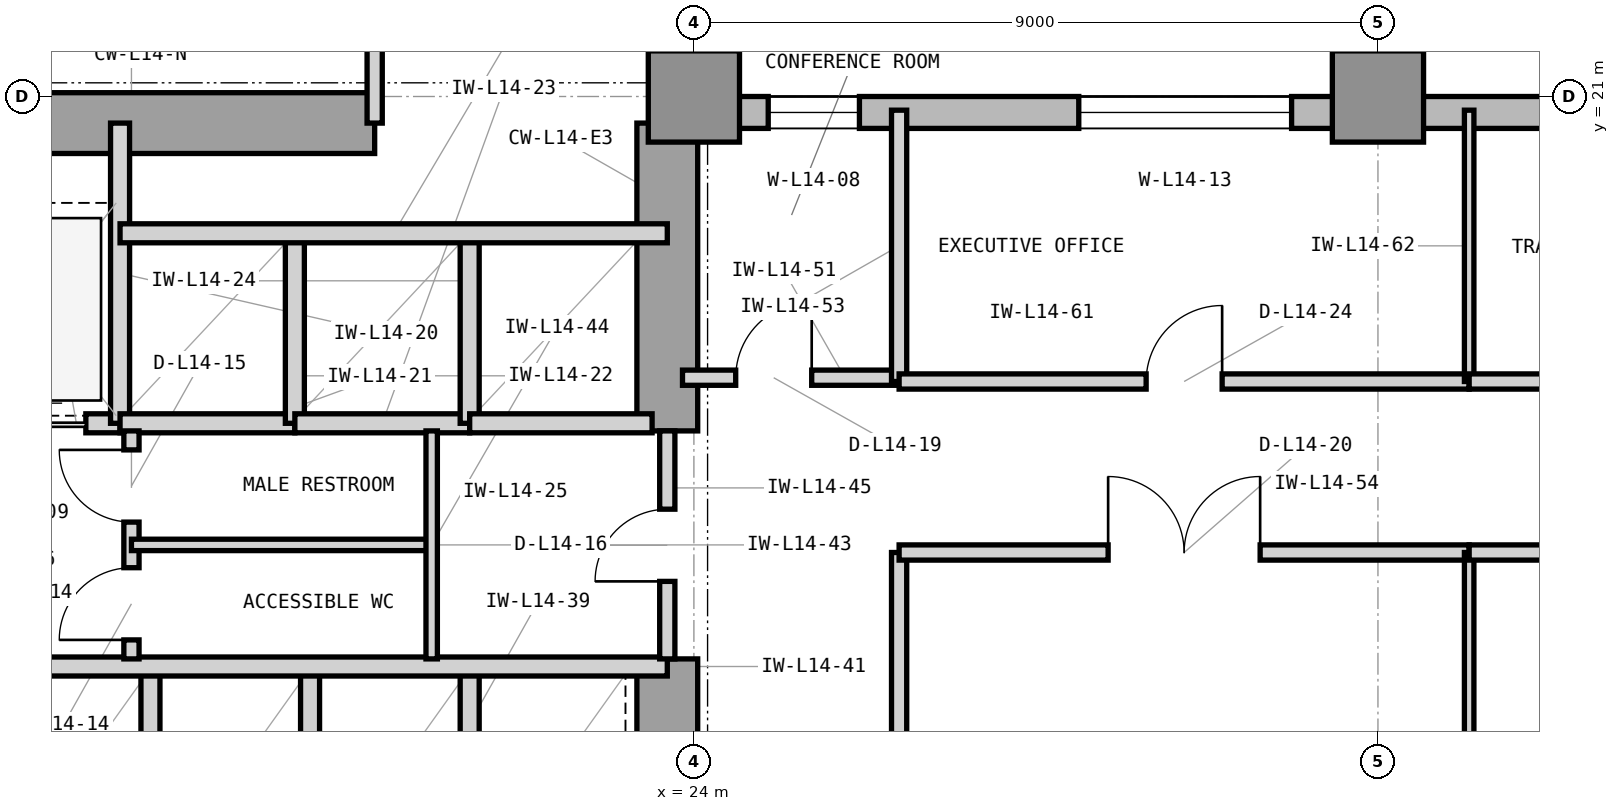
"""IFC4 building model, lengths in metres.
Left out: names, types, materials, properties, quantities, classifications, styles, units other than length and angle.
Written with IfcOpenShell. Run it as: python <this file> out.ifc"""

import sys

from ifc_helpers import new_model, si_unit, direction, frame, frame_2d, origin, origin_2d, place, context, subcontext, project, spatial, rectangle, extrude, element, fill, save


model = new_model("IFC4")
c1 = context("Model", 3, precision=1e-05, world=origin(), true_north=direction((0.0, 1.0)))
c2 = subcontext(c1, "Body", "Model", "MODEL_VIEW")
j1 = project(units=[si_unit("LENGTHUNIT", "METRE"), si_unit("PLANEANGLEUNIT", "RADIAN")], contexts=[c1])
p1 = place(None, origin())
s1 = spatial("IfcSite", under=j1, at=p1, CompositionType="ELEMENT")
p2 = place(p1, origin())
s2 = spatial("IfcBuilding", under=s1, at=p2, CompositionType="ELEMENT")
p3 = place(p2, frame((0.0, 0.0, 63.6)))
s3 = spatial("IfcBuildingStorey", under=s2, at=p3, CompositionType="ELEMENT", Elevation=63.6)
p4 = place(p3, frame((7.475, 20.65, 0.0), z_axis=(0.0, 0.0, 1.0), x_axis=(1.0, 0.0, 0.0)))
e1 = element("IfcWall", 1, at=p4, inside=s3, PredefinedType="SHEAR", context=c2, shape_type="SweptSolid", body=[
    extrude(rectangle(XDim=12.325, YDim=0.8, at=frame_2d((6.163, 0.0))), origin(), (0.0, 0.0, 1.0), 4.2),
])
p5 = place(p3, frame((23.65, 10.4, 0.0), z_axis=(0.0, 0.0, 1.0), x_axis=(0.0, 1.0, 0.0)))
e2 = element("IfcWall", 2, at=p5, inside=s3, PredefinedType="SHEAR", context=c2, shape_type="SweptSolid", body=[
    extrude(rectangle(XDim=3.2, YDim=0.8, at=frame_2d((1.6, 0.0))), origin(), (0.0, 0.0, 1.0), 4.2),
])
p6 = place(p3, frame((23.65, 16.6, 0.0), z_axis=(0.0, 0.0, 1.0), x_axis=(0.0, 1.0, 0.0)))
e3 = element("IfcWall", 3, at=p6, inside=s3, PredefinedType="SHEAR", context=c2, shape_type="SweptSolid", body=[
    extrude(rectangle(XDim=4.05, YDim=0.8, at=frame_2d((2.025, 0.0))), origin(), (0.0, 0.0, 1.0), 4.2),
])
for number, where, z_axis, x_axis in (
    (4, (24.0, 21.0, 0.0), (0.0, 0.0, 1.0), (1.0, 0.0, 0.0)),
    (5, (33.0, 21.0, 0.0), (0.0, 0.0, 1.0), (1.0, 0.0, 0.0)),
):
    element("IfcColumn", number, at=place(p3, frame(where, z_axis=z_axis, x_axis=x_axis)), inside=s3, PredefinedType="COLUMN", context=c2, shape_type="SweptSolid", body=[
        extrude(rectangle(XDim=1.2, YDim=1.2, at=origin_2d()), origin(), (0.0, 0.0, 1.0), 4.2),
    ])
p7 = place(p3, frame((64.4, 20.79, 0.0), z_axis=(0.0, 0.0, 1.0), x_axis=(-1.0, 0.0, 0.0)))
e6 = element("IfcWall", 6, at=p7, inside=s3, PredefinedType="STANDARD", context=c2, shape_type="SweptSolid", body=[
    extrude(rectangle(XDim=40.4, YDim=0.42, at=frame_2d((20.2, 0.0))), origin(), (0.0, 0.0, 1.0), 3.98),
])
p8 = place(p7, frame((26.375, 0.0, 0.85)))
e7 = element("IfcOpeningElement", 7, at=p8, cuts=e6, PredefinedType="OPENING", context=c2, shape_type="SweptSolid", body=[
    extrude(rectangle(XDim=2.8, YDim=2.45, at=frame_2d((1.4, 1.225))), frame((0.0, 0.22, 0.0), z_axis=(0.0, -1.0, 0.0), x_axis=(1.0, 0.0, 0.0)), (0.0, 0.0, 1.0), 0.44),
])
p9 = place(p7, frame((38.222, 0.0, 0.85)))
e8 = element("IfcOpeningElement", 8, at=p9, cuts=e6, PredefinedType="OPENING", context=c2, shape_type="SweptSolid", body=[
    extrude(rectangle(XDim=1.2, YDim=2.45, at=frame_2d((0.6, 1.225))), frame((0.0, 0.22, 0.0), z_axis=(0.0, -1.0, 0.0), x_axis=(1.0, 0.0, 0.0)), (0.0, 0.0, 1.0), 0.44),
])
p10 = place(p7, frame((32.536, 0.0, 0.85)))
e9 = element("IfcOpeningElement", 9, at=p10, cuts=e6, PredefinedType="OPENING", context=c2, shape_type="SweptSolid", body=[
    extrude(rectangle(XDim=2.8, YDim=2.45, at=frame_2d((1.4, 1.225))), frame((0.0, 0.22, 0.0), z_axis=(0.0, -1.0, 0.0), x_axis=(1.0, 0.0, 0.0)), (0.0, 0.0, 1.0), 0.44),
])
p11 = place(p7, frame((17.386, 0.0, 0.85)))
e10 = element("IfcOpeningElement", 10, at=p11, cuts=e6, PredefinedType="OPENING", context=c2, shape_type="SweptSolid", body=[
    extrude(rectangle(XDim=2.8, YDim=2.45, at=frame_2d((1.4, 1.225))), frame((0.0, 0.22, 0.0), z_axis=(0.0, -1.0, 0.0), x_axis=(1.0, 0.0, 0.0)), (0.0, 0.0, 1.0), 0.44),
])
p12 = place(p3, frame((23.79, 21.0, 0.0), z_axis=(0.0, 0.0, 1.0), x_axis=(0.0, 1.0, 0.0)))
e11 = element("IfcWall", 11, at=p12, inside=s3, PredefinedType="STANDARD", context=c2, shape_type="SweptSolid", body=[
    extrude(rectangle(XDim=28.4, YDim=0.42, at=frame_2d((14.2, 0.0))), origin(), (0.0, 0.0, 1.0), 3.98),
])
p13 = place(p12, frame((10.433, 0.0, 0.85)))
e12 = element("IfcOpeningElement", 12, at=p13, cuts=e11, PredefinedType="OPENING", context=c2, shape_type="SweptSolid", body=[
    extrude(rectangle(XDim=2.8, YDim=2.45, at=frame_2d((1.4, 1.225))), frame((0.0, 0.22, 0.0), z_axis=(0.0, -1.0, 0.0), x_axis=(1.0, 0.0, 0.0)), (0.0, 0.0, 1.0), 0.44),
])
p14 = place(p12, frame((16.016, 0.0, 0.85)))
e13 = element("IfcOpeningElement", 13, at=p14, cuts=e11, PredefinedType="OPENING", context=c2, shape_type="SweptSolid", body=[
    extrude(rectangle(XDim=1.2, YDim=2.45, at=frame_2d((0.6, 1.225))), frame((0.0, 0.22, 0.0), z_axis=(0.0, -1.0, 0.0), x_axis=(1.0, 0.0, 0.0)), (0.0, 0.0, 1.0), 0.44),
])
p15 = place(p3, frame((14.15, 16.7, 0.0), z_axis=(0.0, 0.0, 1.0), x_axis=(1.0, 0.0, 0.0)))
e14 = element("IfcWall", 14, at=p15, inside=s3, PredefinedType="PARTITIONING", context=c2, shape_type="SweptSolid", body=[
    extrude(rectangle(XDim=2.3, YDim=0.25, at=frame_2d((1.15, 0.0))), origin(), (0.0, 0.0, 1.0), 3.426),
])
p16 = place(p15, frame((0.45, 0.0, 0.0)))
e15 = element("IfcOpeningElement", 15, at=p16, cuts=e14, PredefinedType="OPENING", context=c2, shape_type="SweptSolid", body=[
    extrude(rectangle(XDim=1.4, YDim=2.35, at=frame_2d((0.7, 1.175))), frame((0.0, 0.135, 0.0), z_axis=(0.0, -1.0, 0.0), x_axis=(1.0, 0.0, 0.0)), (0.0, 0.0, 1.0), 0.27),
])
p17 = place(p3, frame((16.45, 16.7, 0.0), z_axis=(0.0, 0.0, 1.0), x_axis=(0.0, 1.0, 0.0)))
e16 = element("IfcWall", 16, at=p17, inside=s3, PredefinedType="PARTITIONING", context=c2, shape_type="SweptSolid", body=[
    extrude(rectangle(XDim=3.95, YDim=0.25, at=frame_2d((1.975, 0.0))), origin(), (0.0, 0.0, 1.0), 3.97),
])
p18 = place(p3, frame((16.45, 16.7, 0.0), z_axis=(0.0, 0.0, 1.0), x_axis=(1.0, 0.0, 0.0)))
e17 = element("IfcWall", 17, at=p18, inside=s3, PredefinedType="PARTITIONING", context=c2, shape_type="SweptSolid", body=[
    extrude(rectangle(XDim=2.3, YDim=0.25, at=frame_2d((1.15, 0.0))), origin(), (0.0, 0.0, 1.0), 3.426),
])
p19 = place(p3, frame((18.75, 16.7, 0.0), z_axis=(0.0, 0.0, 1.0), x_axis=(0.0, 1.0, 0.0)))
e18 = element("IfcWall", 18, at=p19, inside=s3, PredefinedType="PARTITIONING", context=c2, shape_type="SweptSolid", body=[
    extrude(rectangle(XDim=2.5, YDim=0.25, at=frame_2d((1.25, 0.0))), origin(), (0.0, 0.0, 1.0), 3.97),
])
p20 = place(p3, frame((18.75, 16.7, 0.0), z_axis=(0.0, 0.0, 1.0), x_axis=(1.0, 0.0, 0.0)))
e19 = element("IfcWall", 19, at=p20, inside=s3, PredefinedType="PARTITIONING", context=c2, shape_type="SweptSolid", body=[
    extrude(rectangle(XDim=2.3, YDim=0.25, at=frame_2d((1.15, 0.0))), origin(), (0.0, 0.0, 1.0), 3.426),
])
p21 = place(p3, frame((21.05, 16.7, 0.0), z_axis=(0.0, 0.0, 1.0), x_axis=(0.0, 1.0, 0.0)))
e20 = element("IfcWall", 20, at=p21, inside=s3, PredefinedType="PARTITIONING", context=c2, shape_type="SweptSolid", body=[
    extrude(rectangle(XDim=2.5, YDim=0.25, at=frame_2d((1.25, 0.0))), origin(), (0.0, 0.0, 1.0), 3.97),
])
p22 = place(p3, frame((21.05, 16.7, 0.0), z_axis=(0.0, 0.0, 1.0), x_axis=(1.0, 0.0, 0.0)))
e21 = element("IfcWall", 21, at=p22, inside=s3, PredefinedType="PARTITIONING", context=c2, shape_type="SweptSolid", body=[
    extrude(rectangle(XDim=2.4, YDim=0.25, at=frame_2d((1.2, 0.0))), origin(), (0.0, 0.0, 1.0), 3.426),
])
p23 = place(p3, frame((16.45, 19.2, 0.0), z_axis=(0.0, 0.0, 1.0), x_axis=(1.0, 0.0, 0.0)))
e22 = element("IfcWall", 22, at=p23, inside=s3, PredefinedType="PARTITIONING", context=c2, shape_type="SweptSolid", body=[
    extrude(rectangle(XDim=7.2, YDim=0.25, at=frame_2d((3.6, 0.0))), origin(), (0.0, 0.0, 1.0), 3.97),
])
for number, where, z_axis, x_axis in (
    (23, (16.85, 10.5, 0.0), (0.0, 0.0, 1.0), (0.0, 1.0, 0.0)),
    (24, (18.95, 10.5, 0.0), (0.0, 0.0, 1.0), (0.0, 1.0, 0.0)),
    (25, (21.05, 10.5, 0.0), (0.0, 0.0, 1.0), (0.0, 1.0, 0.0)),
):
    element("IfcWall", number, at=place(p3, frame(where, z_axis=z_axis, x_axis=x_axis)), inside=s3, PredefinedType="PARTITIONING", context=c2, shape_type="SweptSolid", body=[
        extrude(rectangle(XDim=3.0, YDim=0.25, at=frame_2d((1.5, 0.0))), origin(), (0.0, 0.0, 1.0), 3.97),
    ])
p24 = place(p3, frame((14.7, 13.5, 0.0), z_axis=(0.0, 0.0, 1.0), x_axis=(1.0, 0.0, 0.0)))
e26 = element("IfcWall", 26, at=p24, inside=s3, PredefinedType="PARTITIONING", context=c2, shape_type="SweptSolid", body=[
    extrude(rectangle(XDim=8.95, YDim=0.25, at=frame_2d((4.475, 0.0))), origin(), (0.0, 0.0, 1.0), 3.426),
])
p25 = place(p3, frame((16.6, 13.6, 0.0), z_axis=(0.0, 0.0, 1.0), x_axis=(0.0, 1.0, 0.0)))
e27 = element("IfcWall", 27, at=p25, inside=s3, PredefinedType="PARTITIONING", context=c2, shape_type="SweptSolid", body=[
    extrude(rectangle(XDim=3.0, YDim=0.2, at=frame_2d((1.5, 0.0))), origin(), (0.0, 0.0, 1.0), 3.97),
])
p26 = place(p25, frame((0.25, 0.0, 0.0)))
e28 = element("IfcOpeningElement", 28, at=p26, cuts=e27, PredefinedType="OPENING", context=c2, shape_type="SweptSolid", body=[
    extrude(rectangle(XDim=0.95, YDim=2.1, at=frame_2d((0.475, 1.05))), frame((0.0, 0.11, 0.0), z_axis=(0.0, -1.0, 0.0), x_axis=(1.0, 0.0, 0.0)), (0.0, 0.0, 1.0), 0.22),
])
p27 = place(p25, frame((1.8, 0.0, 0.0)))
e29 = element("IfcOpeningElement", 29, at=p27, cuts=e27, PredefinedType="OPENING", context=c2, shape_type="SweptSolid", body=[
    extrude(rectangle(XDim=0.95, YDim=2.1, at=frame_2d((0.475, 1.05))), frame((0.0, 0.11, 0.0), z_axis=(0.0, -1.0, 0.0), x_axis=(1.0, 0.0, 0.0)), (0.0, 0.0, 1.0), 0.22),
])
p28 = place(p3, frame((16.6, 15.1, 0.0), z_axis=(0.0, 0.0, 1.0), x_axis=(1.0, 0.0, 0.0)))
e30 = element("IfcWall", 30, at=p28, inside=s3, PredefinedType="PARTITIONING", context=c2, shape_type="SweptSolid", body=[
    extrude(rectangle(XDim=3.95, YDim=0.15, at=frame_2d((1.975, 0.0))), origin(), (0.0, 0.0, 1.0), 3.97),
])
p29 = place(p3, frame((20.55, 13.6, 0.0), z_axis=(0.0, 0.0, 1.0), x_axis=(0.0, 1.0, 0.0)))
e31 = element("IfcWall", 31, at=p29, inside=s3, PredefinedType="PARTITIONING", context=c2, shape_type="SweptSolid", body=[
    extrude(rectangle(XDim=3.0, YDim=0.15, at=frame_2d((1.5, 0.0))), origin(), (0.0, 0.0, 1.0), 3.97),
])
p30 = place(p3, frame((23.65, 13.6, 0.0), z_axis=(0.0, 0.0, 1.0), x_axis=(0.0, 1.0, 0.0)))
e32 = element("IfcWall", 32, at=p30, inside=s3, PredefinedType="PARTITIONING", context=c2, shape_type="SweptSolid", body=[
    extrude(rectangle(XDim=3.0, YDim=0.2, at=frame_2d((1.5, 0.0))), origin(), (0.0, 0.0, 1.0), 3.97),
])
p31 = place(p30, frame((1.02, 0.0, 0.0)))
e33 = element("IfcOpeningElement", 33, at=p31, cuts=e32, PredefinedType="OPENING", context=c2, shape_type="SweptSolid", body=[
    extrude(rectangle(XDim=0.95, YDim=2.1, at=frame_2d((0.475, 1.05))), frame((0.0, 0.11, 0.0), z_axis=(0.0, -1.0, 0.0), x_axis=(1.0, 0.0, 0.0)), (0.0, 0.0, 1.0), 0.22),
])
p32 = place(p3, frame((23.85, 17.3, 0.0), z_axis=(0.0, 0.0, 1.0), x_axis=(1.0, 0.0, 0.0)))
e34 = element("IfcWall", 34, at=p32, inside=s3, PredefinedType="PARTITIONING", context=c2, shape_type="SweptSolid", body=[
    extrude(rectangle(XDim=2.85, YDim=0.2, at=frame_2d((1.425, 0.0))), origin(), (0.0, 0.0, 1.0), 3.97),
])
p33 = place(p32, frame((0.7, 0.0, 0.0)))
e35 = element("IfcOpeningElement", 35, at=p33, cuts=e34, PredefinedType="OPENING", context=c2, shape_type="SweptSolid", body=[
    extrude(rectangle(XDim=1.0, YDim=2.15, at=frame_2d((0.5, 1.075))), frame((0.0, 0.11, 0.0), z_axis=(0.0, -1.0, 0.0), x_axis=(1.0, 0.0, 0.0)), (0.0, 0.0, 1.0), 0.22),
])
p34 = place(p3, frame((26.7, 3.18, 0.0), z_axis=(0.0, 0.0, 1.0), x_axis=(0.0, 1.0, 0.0)))
e36 = element("IfcWall", 36, at=p34, inside=s3, PredefinedType="PARTITIONING", context=c2, shape_type="SweptSolid", body=[
    extrude(rectangle(XDim=11.82, YDim=0.2, at=frame_2d((5.91, 0.0))), origin(), (0.0, 0.0, 1.0), 3.97),
])
p35 = place(p3, frame((26.7, 17.25, 0.0), z_axis=(0.0, 0.0, 1.0), x_axis=(0.0, 1.0, 0.0)))
e37 = element("IfcWall", 37, at=p35, inside=s3, PredefinedType="PARTITIONING", context=c2, shape_type="SweptSolid", body=[
    extrude(rectangle(XDim=3.57, YDim=0.2, at=frame_2d((1.785, 0.0))), origin(), (0.0, 0.0, 1.0), 3.97),
])
p36 = place(p3, frame((26.7, 15.0, 0.0), z_axis=(0.0, 0.0, 1.0), x_axis=(1.0, 0.0, 0.0)))
e38 = element("IfcWall", 38, at=p36, inside=s3, PredefinedType="PARTITIONING", context=c2, shape_type="SweptSolid", body=[
    extrude(rectangle(XDim=7.5, YDim=0.2, at=frame_2d((3.75, 0.0))), origin(), (0.0, 0.0, 1.0), 3.426),
])
p37 = place(p36, frame((2.75, 0.0, 0.0)))
e39 = element("IfcOpeningElement", 39, at=p37, cuts=e38, PredefinedType="OPENING", context=c2, shape_type="SweptSolid", body=[
    extrude(rectangle(XDim=2.0, YDim=2.5, at=frame_2d((1.0, 1.25))), frame((0.0, 0.11, 0.0), z_axis=(0.0, -1.0, 0.0), x_axis=(1.0, 0.0, 0.0)), (0.0, 0.0, 1.0), 0.22),
])
p38 = place(p3, frame((34.2, 3.18, 0.0), z_axis=(0.0, 0.0, 1.0), x_axis=(0.0, 1.0, 0.0)))
e40 = element("IfcWall", 40, at=p38, inside=s3, PredefinedType="PARTITIONING", context=c2, shape_type="SweptSolid", body=[
    extrude(rectangle(XDim=11.82, YDim=0.125, at=frame_2d((5.91, 0.0))), origin(), (0.0, 0.0, 1.0), 3.97),
])
p39 = place(p3, frame((34.2, 15.0, 0.0), z_axis=(0.0, 0.0, 1.0), x_axis=(1.0, 0.0, 0.0)))
e41 = element("IfcWall", 41, at=p39, inside=s3, PredefinedType="PARTITIONING", context=c2, shape_type="SweptSolid", body=[
    extrude(rectangle(XDim=7.5, YDim=0.2, at=frame_2d((3.75, 0.0))), origin(), (0.0, 0.0, 1.0), 3.426),
])
p40 = place(p39, frame((3.25, 0.0, 0.0)))
e42 = element("IfcOpeningElement", 42, at=p40, cuts=e41, PredefinedType="OPENING", context=c2, shape_type="SweptSolid", body=[
    extrude(rectangle(XDim=1.0, YDim=2.15, at=frame_2d((0.5, 1.075))), frame((0.0, 0.11, 0.0), z_axis=(0.0, -1.0, 0.0), x_axis=(1.0, 0.0, 0.0)), (0.0, 0.0, 1.0), 0.22),
])
p41 = place(p3, frame((26.7, 17.25, 0.0), z_axis=(0.0, 0.0, 1.0), x_axis=(1.0, 0.0, 0.0)))
e43 = element("IfcWall", 43, at=p41, inside=s3, PredefinedType="PARTITIONING", context=c2, shape_type="SweptSolid", body=[
    extrude(rectangle(XDim=7.5, YDim=0.2, at=frame_2d((3.75, 0.0))), origin(), (0.0, 0.0, 1.0), 3.97),
])
p42 = place(p41, frame((3.25, 0.0, 0.0)))
e44 = element("IfcOpeningElement", 44, at=p42, cuts=e43, PredefinedType="OPENING", context=c2, shape_type="SweptSolid", body=[
    extrude(rectangle(XDim=1.0, YDim=2.15, at=frame_2d((0.5, 1.075))), frame((0.0, 0.11, 0.0), z_axis=(0.0, -1.0, 0.0), x_axis=(1.0, 0.0, 0.0)), (0.0, 0.0, 1.0), 0.22),
])
p43 = place(p3, frame((34.2, 17.25, 0.0), z_axis=(0.0, 0.0, 1.0), x_axis=(0.0, 1.0, 0.0)))
e45 = element("IfcWall", 45, at=p43, inside=s3, PredefinedType="PARTITIONING", context=c2, shape_type="SweptSolid", body=[
    extrude(rectangle(XDim=3.57, YDim=0.125, at=frame_2d((1.785, 0.0))), origin(), (0.0, 0.0, 1.0), 3.97),
])
p44 = place(p3, frame((34.2, 17.25, 0.0), z_axis=(0.0, 0.0, 1.0), x_axis=(1.0, 0.0, 0.0)))
e46 = element("IfcWall", 46, at=p44, inside=s3, PredefinedType="PARTITIONING", context=c2, shape_type="SweptSolid", body=[
    extrude(rectangle(XDim=9.0, YDim=0.2, at=frame_2d((4.5, 0.0))), origin(), (0.0, 0.0, 1.0), 3.97),
])
p45 = place(p44, frame((4.0, 0.0, 0.0)))
e47 = element("IfcOpeningElement", 47, at=p45, cuts=e46, PredefinedType="OPENING", context=c2, shape_type="SweptSolid", body=[
    extrude(rectangle(XDim=1.0, YDim=2.15, at=frame_2d((0.5, 1.075))), frame((0.0, 0.11, 0.0), z_axis=(0.0, -1.0, 0.0), x_axis=(1.0, 0.0, 0.0)), (0.0, 0.0, 1.0), 0.22),
])
p46 = place(p3, frame((19.8, 20.65, 0.0), z_axis=(0.0, 0.0, 1.0), x_axis=(0.0, 1.0, 0.0)))
e48 = element("IfcWall", 48, at=p46, inside=s3, PredefinedType="PARTITIONING", context=c2, shape_type="SweptSolid", body=[
    extrude(rectangle(XDim=6.15, YDim=0.2, at=frame_2d((3.075, 0.0))), origin(), (0.0, 0.0, 1.0), 3.97),
])
p47 = place(p16, origin())
e49 = element("IfcDoor", 49, at=p47, inside=s3, OperationType="DOUBLE_DOOR_SLIDING", PredefinedType="DOOR", context=c2, shape_type="SweptSolid", body=[
    extrude(rectangle(XDim=1.4, YDim=2.35, at=frame_2d((0.7, 1.175))), frame((0.0, 0.025, 0.0), z_axis=(0.0, -1.0, 0.0), x_axis=(1.0, 0.0, 0.0)), (0.0, 0.0, 1.0), 0.05),
])
fill(e15, e49)
p48 = place(p26, origin())
e50 = element("IfcDoor", 50, at=p48, inside=s3, OperationType="SINGLE_SWING_LEFT", PredefinedType="DOOR", context=c2, shape_type="SweptSolid", body=[
    extrude(rectangle(XDim=0.95, YDim=2.1, at=frame_2d((0.475, 1.05))), frame((0.0, 0.025, 0.0), z_axis=(0.0, -1.0, 0.0), x_axis=(1.0, 0.0, 0.0)), (0.0, 0.0, 1.0), 0.05),
])
fill(e28, e50)
p49 = place(p27, origin())
e51 = element("IfcDoor", 51, at=p49, inside=s3, OperationType="SINGLE_SWING_RIGHT", PredefinedType="DOOR", context=c2, shape_type="SweptSolid", body=[
    extrude(rectangle(XDim=0.95, YDim=2.1, at=frame_2d((0.475, 1.05))), frame((0.0, 0.025, 0.0), z_axis=(0.0, -1.0, 0.0), x_axis=(1.0, 0.0, 0.0)), (0.0, 0.0, 1.0), 0.05),
])
fill(e29, e51)
p50 = place(p31, origin())
e52 = element("IfcDoor", 52, at=p50, inside=s3, OperationType="SINGLE_SWING_LEFT", PredefinedType="DOOR", context=c2, shape_type="SweptSolid", body=[
    extrude(rectangle(XDim=0.95, YDim=2.1, at=frame_2d((0.475, 1.05))), frame((0.0, 0.025, 0.0), z_axis=(0.0, -1.0, 0.0), x_axis=(1.0, 0.0, 0.0)), (0.0, 0.0, 1.0), 0.05),
])
fill(e33, e52)
p51 = place(p33, origin())
e53 = element("IfcDoor", 53, at=p51, inside=s3, OperationType="SINGLE_SWING_RIGHT", PredefinedType="DOOR", context=c2, shape_type="SweptSolid", body=[
    extrude(rectangle(XDim=1.0, YDim=2.15, at=frame_2d((0.5, 1.075))), frame((0.0, 0.025, 0.0), z_axis=(0.0, -1.0, 0.0), x_axis=(1.0, 0.0, 0.0)), (0.0, 0.0, 1.0), 0.05),
])
fill(e35, e53)
p52 = place(p37, origin())
e54 = element("IfcDoor", 54, at=p52, inside=s3, OperationType="DOUBLE_DOOR_SINGLE_SWING", PredefinedType="DOOR", context=c2, shape_type="SweptSolid", body=[
    extrude(rectangle(XDim=2.0, YDim=2.5, at=frame_2d((1.0, 1.25))), frame((0.0, 0.025, 0.0), z_axis=(0.0, -1.0, 0.0), x_axis=(1.0, 0.0, 0.0)), (0.0, 0.0, 1.0), 0.05),
])
fill(e39, e54)
p53 = place(p42, origin())
e55 = element("IfcDoor", 55, at=p53, inside=s3, OperationType="SINGLE_SWING_RIGHT", PredefinedType="DOOR", context=c2, shape_type="SweptSolid", body=[
    extrude(rectangle(XDim=1.0, YDim=2.15, at=frame_2d((0.5, 1.075))), frame((0.0, 0.025, 0.0), z_axis=(0.0, -1.0, 0.0), x_axis=(1.0, 0.0, 0.0)), (0.0, 0.0, 1.0), 0.05),
])
fill(e44, e55)
p54 = place(p9, origin())
e56 = element("IfcWindow", 56, at=p54, inside=s3, PartitioningType="SINGLE_PANEL", PredefinedType="WINDOW", context=c2, shape_type="SweptSolid", body=[
    extrude(rectangle(XDim=1.2, YDim=2.45, at=frame_2d((0.6, 1.225))), frame((0.0, 0.11, 0.0), z_axis=(0.0, -1.0, 0.0), x_axis=(1.0, 0.0, 0.0)), (0.0, 0.0, 1.0), 0.06),
])
fill(e8, e56)
p55 = place(p10, origin())
e57 = element("IfcWindow", 57, at=p55, inside=s3, PartitioningType="SINGLE_PANEL", PredefinedType="WINDOW", context=c2, shape_type="SweptSolid", body=[
    extrude(rectangle(XDim=2.8, YDim=2.45, at=frame_2d((1.4, 1.225))), frame((0.0, 0.11, 0.0), z_axis=(0.0, -1.0, 0.0), x_axis=(1.0, 0.0, 0.0)), (0.0, 0.0, 1.0), 0.06),
])
fill(e9, e57)
save(model, sys.argv[1])
